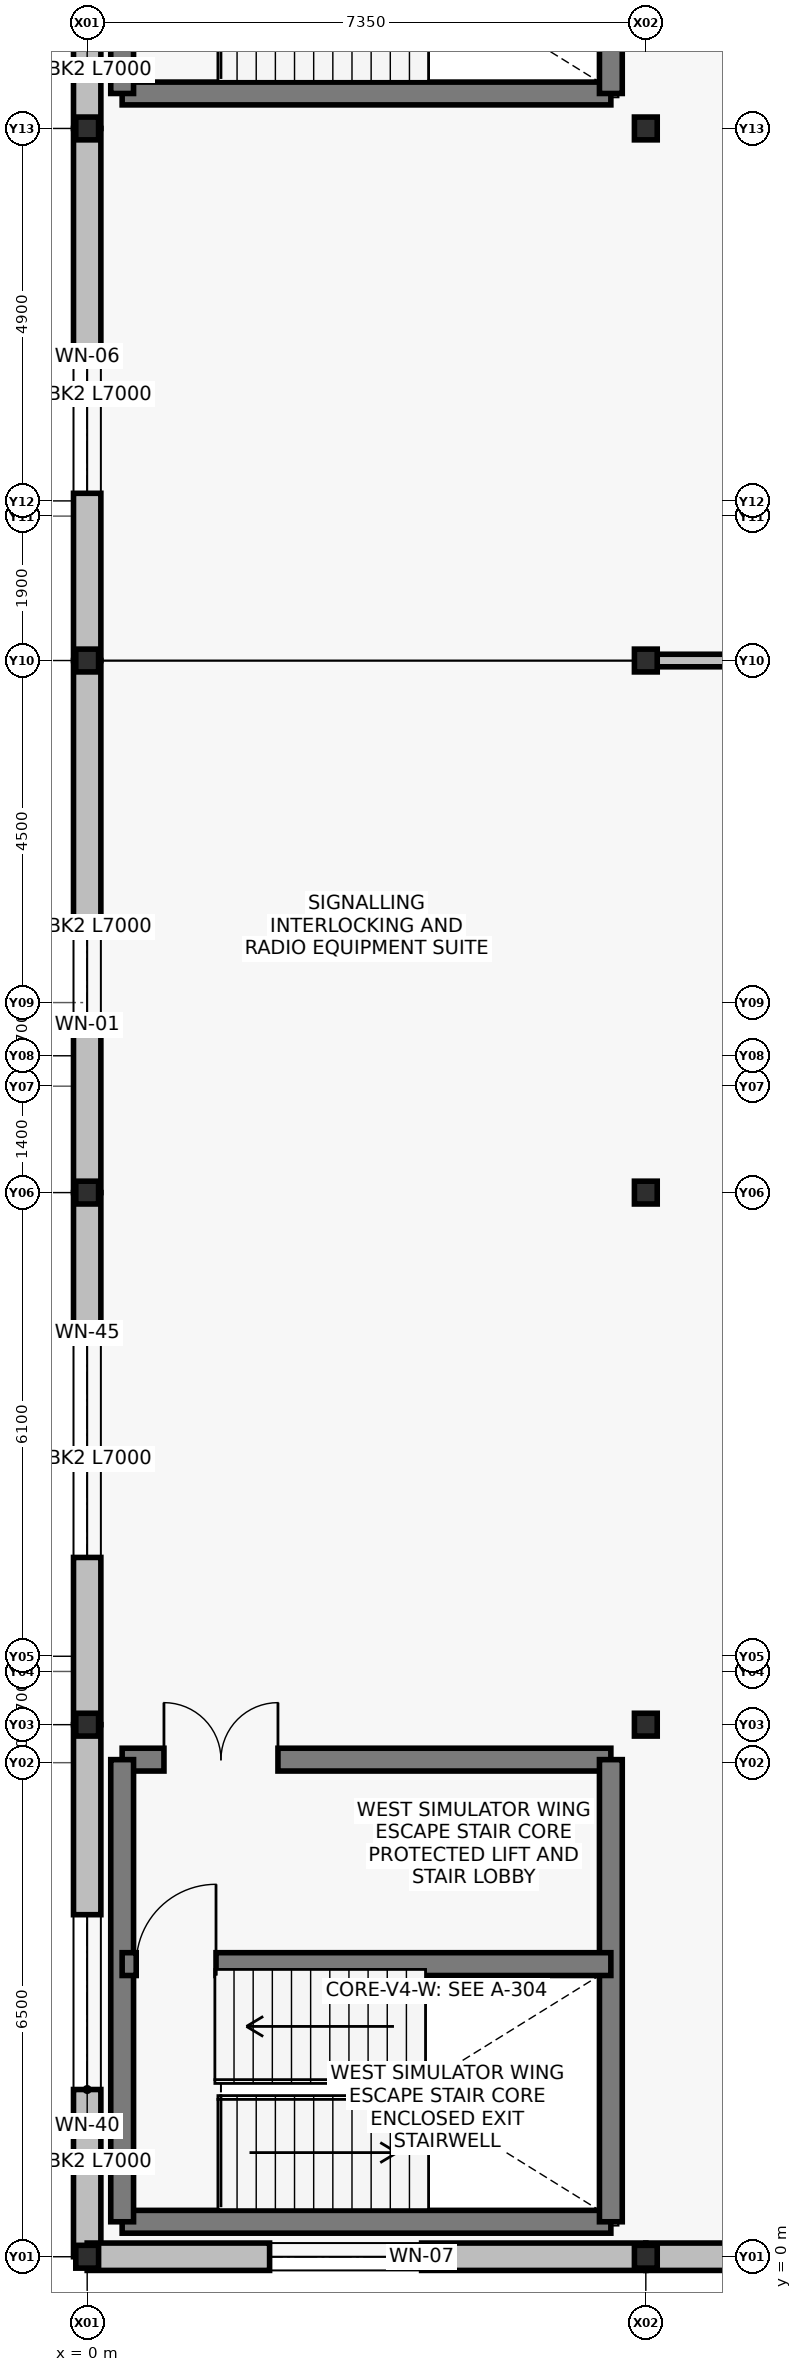
"""IFC4 building model, lengths in metres.
Left out: names, types, materials, properties, quantities, classifications, styles, units other than length and angle.
Written with IfcOpenShell. Run it as: python <this file> out.ifc"""

import sys

from ifc_helpers import new_model, si_unit, direction, frame, frame_2d, origin, origin_with_axes, origin_2d, place, context, subcontext, project, spatial, rectangle, i_section, extrude, element, fill, save


model = new_model("IFC4")
c1 = context("Model", 3, precision=1e-05, world=origin(), true_north=direction((0.0, 1.0)))
c2 = subcontext(c1, "Body", "Model", "MODEL_VIEW")
j1 = project(units=[si_unit("LENGTHUNIT", "METRE"), si_unit("PLANEANGLEUNIT", "RADIAN")], contexts=[c1])
p1 = place(None, origin())
s1 = spatial("IfcSite", under=j1, at=p1, CompositionType="ELEMENT")
p2 = place(p1, origin())
s2 = spatial("IfcBuilding", under=s1, at=p2, CompositionType="ELEMENT")
p3 = place(p2, frame((0.0, 0.0, 11.1)))
s3 = spatial("IfcBuildingStorey", under=s2, at=p3, CompositionType="ELEMENT", Elevation=11.1)
for number, where, z_axis, x_axis in (
    (1, (0.0, 0.0, 0.0), (0.0, 0.0, 1.0), (1.0, 0.0, 0.0)),
    (2, (0.0, 7.0, 0.0), (0.0, 0.0, 1.0), (1.0, 0.0, 0.0)),
    (3, (0.0, 14.0, 0.0), (0.0, 0.0, 1.0), (1.0, 0.0, 0.0)),
    (4, (0.0, 21.0, 0.0), (0.0, 0.0, 1.0), (1.0, 0.0, 0.0)),
    (5, (0.0, 28.0, 0.0), (0.0, 0.0, 1.0), (1.0, 0.0, 0.0)),
    (6, (7.35, 0.0, 0.0), (0.0, 0.0, 1.0), (1.0, 0.0, 0.0)),
    (7, (7.35, 7.0, 0.0), (0.0, 0.0, 1.0), (1.0, 0.0, 0.0)),
    (8, (7.35, 14.0, 0.0), (0.0, 0.0, 1.0), (1.0, 0.0, 0.0)),
    (9, (7.35, 21.0, 0.0), (0.0, 0.0, 1.0), (1.0, 0.0, 0.0)),
    (10, (7.35, 28.0, 0.0), (0.0, 0.0, 1.0), (1.0, 0.0, 0.0)),
):
    element("IfcColumn", number, at=place(p3, frame(where, z_axis=z_axis, x_axis=x_axis)), inside=s3, PredefinedType="COLUMN", context=c2, shape_type="SweptSolid", body=[
        extrude(i_section(OverallWidth=0.3, OverallDepth=0.3, WebThickness=0.01, FlangeThickness=0.015, at=origin_2d()), origin(), (0.0, 0.0, 1.0), 4.2),
    ])
p4 = place(p3, frame((0.0, 0.0, 0.0), z_axis=(0.0, 0.0, 1.0), x_axis=(0.0, 1.0, 0.0)))
e11 = element("IfcWall", 11, at=p4, inside=s3, PredefinedType="SOLIDWALL", context=c2, shape_type="SweptSolid", body=[
    extrude(rectangle(XDim=7.0, YDim=0.36, at=frame_2d((3.5, 0.0))), origin(), (0.0, 0.0, 1.0), 3.35),
])
p5 = place(p4, frame((2.2, 0.0, 0.95)))
e12 = element("IfcOpeningElement", 12, at=p5, cuts=e11, PredefinedType="OPENING", context=c2, shape_type="SweptSolid", body=[
    extrude(rectangle(XDim=2.3, YDim=1.85, at=frame_2d((1.15, 0.925))), frame((0.0, 0.19, 0.0), z_axis=(0.0, -1.0, 0.0), x_axis=(1.0, 0.0, 0.0)), (0.0, 0.0, 1.0), 0.38),
])
p6 = place(p3, frame((0.0, 7.0, 0.0), z_axis=(0.0, 0.0, 1.0), x_axis=(0.0, 1.0, 0.0)))
e13 = element("IfcWall", 13, at=p6, inside=s3, PredefinedType="SOLIDWALL", context=c2, shape_type="SweptSolid", body=[
    extrude(rectangle(XDim=7.0, YDim=0.36, at=frame_2d((3.5, 0.0))), origin(), (0.0, 0.0, 1.0), 3.35),
])
p7 = place(p6, frame((2.2, 0.0, 0.95)))
e14 = element("IfcOpeningElement", 14, at=p7, cuts=e13, PredefinedType="OPENING", context=c2, shape_type="SweptSolid", body=[
    extrude(rectangle(XDim=2.95, YDim=2.15, at=frame_2d((1.475, 1.075))), frame((0.0, 0.19, 0.0), z_axis=(0.0, -1.0, 0.0), x_axis=(1.0, 0.0, 0.0)), (0.0, 0.0, 1.0), 0.38),
])
p8 = place(p3, frame((0.0, 14.0, 0.0), z_axis=(0.0, 0.0, 1.0), x_axis=(0.0, 1.0, 0.0)))
e15 = element("IfcWall", 15, at=p8, inside=s3, PredefinedType="SOLIDWALL", context=c2, shape_type="SweptSolid", body=[
    extrude(rectangle(XDim=7.0, YDim=0.36, at=frame_2d((3.5, 0.0))), origin(), (0.0, 0.0, 1.0), 3.35),
])
p9 = place(p8, frame((2.2, 0.0, 0.95)))
e16 = element("IfcOpeningElement", 16, at=p9, cuts=e15, PredefinedType="OPENING", context=c2, shape_type="SweptSolid", body=[
    extrude(rectangle(XDim=1.2, YDim=1.5, at=frame_2d((0.6, 0.75))), frame((0.0, 0.19, 0.0), z_axis=(0.0, -1.0, 0.0), x_axis=(1.0, 0.0, 0.0)), (0.0, 0.0, 1.0), 0.38),
])
p10 = place(p3, frame((0.0, 21.0, 0.0), z_axis=(0.0, 0.0, 1.0), x_axis=(0.0, 1.0, 0.0)))
e17 = element("IfcWall", 17, at=p10, inside=s3, PredefinedType="SOLIDWALL", context=c2, shape_type="SweptSolid", body=[
    extrude(rectangle(XDim=7.0, YDim=0.36, at=frame_2d((3.5, 0.0))), origin(), (0.0, 0.0, 1.0), 3.35),
])
p11 = place(p10, frame((2.2, 0.0, 0.95)))
e18 = element("IfcOpeningElement", 18, at=p11, cuts=e17, PredefinedType="OPENING", context=c2, shape_type="SweptSolid", body=[
    extrude(rectangle(XDim=1.8, YDim=2.1, at=frame_2d((0.9, 1.05))), frame((0.0, 0.19, 0.0), z_axis=(0.0, -1.0, 0.0), x_axis=(1.0, 0.0, 0.0)), (0.0, 0.0, 1.0), 0.38),
])
p12 = place(p3, frame((0.0, 28.0, 0.0), z_axis=(0.0, 0.0, 1.0), x_axis=(0.0, 1.0, 0.0)))
e19 = element("IfcWall", 19, at=p12, inside=s3, PredefinedType="SOLIDWALL", context=c2, shape_type="SweptSolid", body=[
    extrude(rectangle(XDim=7.0, YDim=0.36, at=frame_2d((3.5, 0.0))), origin(), (0.0, 0.0, 1.0), 3.35),
])
p13 = place(p12, frame((2.2, 0.0, 0.95)))
e20 = element("IfcOpeningElement", 20, at=p13, cuts=e19, PredefinedType="OPENING", context=c2, shape_type="SweptSolid", body=[
    extrude(rectangle(XDim=2.6, YDim=2.0, at=frame_2d((1.3, 1.0))), frame((0.0, 0.19, 0.0), z_axis=(0.0, -1.0, 0.0), x_axis=(1.0, 0.0, 0.0)), (0.0, 0.0, 1.0), 0.38),
])
p14 = place(p3, origin_with_axes())
e21 = element("IfcWall", 21, at=p14, inside=s3, PredefinedType="SOLIDWALL", context=c2, shape_type="SweptSolid", body=[
    extrude(rectangle(XDim=7.35, YDim=0.36, at=frame_2d((3.675, 0.0))), origin(), (0.0, 0.0, 1.0), 3.35),
])
p15 = place(p14, frame((2.4, 0.0, 0.9)))
e22 = element("IfcOpeningElement", 22, at=p15, cuts=e21, PredefinedType="OPENING", context=c2, shape_type="SweptSolid", body=[
    extrude(rectangle(XDim=2.0, YDim=1.8, at=frame_2d((1.0, 0.9))), frame((0.0, 0.19, 0.0), z_axis=(0.0, -1.0, 0.0), x_axis=(1.0, 0.0, 0.0)), (0.0, 0.0, 1.0), 0.38),
])
p16 = place(p3, frame((7.35, 0.0, 0.0), z_axis=(0.0, 0.0, 1.0), x_axis=(1.0, 0.0, 0.0)))
e23 = element("IfcWall", 23, at=p16, inside=s3, PredefinedType="SOLIDWALL", context=c2, shape_type="SweptSolid", body=[
    extrude(rectangle(XDim=7.35, YDim=0.36, at=frame_2d((3.675, 0.0))), origin(), (0.0, 0.0, 1.0), 3.35),
])
p17 = place(p16, frame((2.4, 0.0, 0.9)))
e24 = element("IfcOpeningElement", 24, at=p17, cuts=e23, PredefinedType="OPENING", context=c2, shape_type="SweptSolid", body=[
    extrude(rectangle(XDim=2.1, YDim=2.1, at=frame_2d((1.05, 1.05))), frame((0.0, 0.19, 0.0), z_axis=(0.0, -1.0, 0.0), x_axis=(1.0, 0.0, 0.0)), (0.0, 0.0, 1.0), 0.38),
])
p18 = place(p3, frame((0.46, 28.46, 0.0), z_axis=(0.0, 0.0, 1.0), x_axis=(1.0, 0.0, 0.0)))
e25 = element("IfcWall", 25, at=p18, inside=s3, PredefinedType="SHEAR", context=c2, shape_type="SweptSolid", body=[
    extrude(rectangle(XDim=6.43, YDim=0.3, at=frame_2d((3.215, 0.0))), origin(), (0.0, 0.0, 1.0), 3.92),
])
for number, where, z_axis, x_axis in (
    (26, (0.46, 28.46, 0.0), (0.0, 0.0, 1.0), (0.0, 1.0, 0.0)),
    (27, (6.89, 28.46, 0.0), (0.0, 0.0, 1.0), (0.0, 1.0, 0.0)),
):
    element("IfcWall", number, at=place(p3, frame(where, z_axis=z_axis, x_axis=x_axis)), inside=s3, PredefinedType="SHEAR", context=c2, shape_type="SweptSolid", body=[
        extrude(rectangle(XDim=6.08, YDim=0.3, at=frame_2d((3.04, 0.0))), origin(), (0.0, 0.0, 1.0), 3.92),
    ])
p19 = place(p3, frame((0.46, 0.46, 0.0), z_axis=(0.0, 0.0, 1.0), x_axis=(1.0, 0.0, 0.0)))
e28 = element("IfcWall", 28, at=p19, inside=s3, PredefinedType="SHEAR", context=c2, shape_type="SweptSolid", body=[
    extrude(rectangle(XDim=6.43, YDim=0.3, at=frame_2d((3.215, 0.0))), origin(), (0.0, 0.0, 1.0), 3.92),
])
p20 = place(p3, frame((0.46, 6.54, 0.0), z_axis=(0.0, 0.0, 1.0), x_axis=(1.0, 0.0, 0.0)))
e29 = element("IfcWall", 29, at=p20, inside=s3, PredefinedType="SHEAR", context=c2, shape_type="SweptSolid", body=[
    extrude(rectangle(XDim=6.43, YDim=0.3, at=frame_2d((3.215, 0.0))), origin(), (0.0, 0.0, 1.0), 3.92),
])
p21 = place(p20, frame((0.55, 0.0, 0.0)))
e30 = element("IfcOpeningElement", 30, at=p21, cuts=e29, PredefinedType="OPENING", context=c2, shape_type="SweptSolid", body=[
    extrude(rectangle(XDim=1.5, YDim=2.2, at=frame_2d((0.75, 1.1))), frame((0.0, 0.16, 0.0), z_axis=(0.0, -1.0, 0.0), x_axis=(1.0, 0.0, 0.0)), (0.0, 0.0, 1.0), 0.32),
])
for number, where, z_axis, x_axis in (
    (31, (0.46, 0.46, 0.0), (0.0, 0.0, 1.0), (0.0, 1.0, 0.0)),
    (32, (6.89, 0.46, 0.0), (0.0, 0.0, 1.0), (0.0, 1.0, 0.0)),
):
    element("IfcWall", number, at=place(p3, frame(where, z_axis=z_axis, x_axis=x_axis)), inside=s3, PredefinedType="SHEAR", context=c2, shape_type="SweptSolid", body=[
        extrude(rectangle(XDim=6.08, YDim=0.3, at=frame_2d((3.04, 0.0))), origin(), (0.0, 0.0, 1.0), 3.92),
    ])
p22 = place(p3, frame((0.46, 3.85, 0.0), z_axis=(0.0, 0.0, 1.0), x_axis=(1.0, 0.0, 0.0)))
e33 = element("IfcWall", 33, at=p22, inside=s3, PredefinedType="SHEAR", context=c2, shape_type="SweptSolid", body=[
    extrude(rectangle(XDim=6.43, YDim=0.3, at=frame_2d((3.215, 0.0))), origin(), (0.0, 0.0, 1.0), 3.92),
])
p23 = place(p22, frame((0.185, 0.0, 0.0)))
e34 = element("IfcOpeningElement", 34, at=p23, cuts=e33, PredefinedType="OPENING", context=c2, shape_type="SweptSolid", body=[
    extrude(rectangle(XDim=1.05, YDim=2.15, at=frame_2d((0.525, 1.075))), frame((0.0, 0.16, 0.0), z_axis=(0.0, -1.0, 0.0), x_axis=(1.0, 0.0, 0.0)), (0.0, 0.0, 1.0), 0.32),
])
p24 = place(p3, frame((7.35, 21.0, 0.0), z_axis=(0.0, 0.0, 1.0), x_axis=(1.0, 0.0, 0.0)))
e35 = element("IfcWall", 35, at=p24, inside=s3, PredefinedType="PARTITIONING", context=c2, shape_type="SweptSolid", body=[
    extrude(rectangle(XDim=29.4, YDim=0.165, at=frame_2d((14.7, 0.0))), origin(), (0.0, 0.0, 1.0), 3.15),
])
p25 = place(p24, frame((4.0, 0.0, 0.0)))
e36 = element("IfcOpeningElement", 36, at=p25, cuts=e35, PredefinedType="OPENING", context=c2, shape_type="SweptSolid", body=[
    extrude(rectangle(XDim=1.35, YDim=2.2, at=frame_2d((0.675, 1.1))), frame((0.0, 0.092, 0.0), z_axis=(0.0, -1.0, 0.0), x_axis=(1.0, 0.0, 0.0)), (0.0, 0.0, 1.0), 0.185),
])
p26 = place(p24, frame((18.5, 0.0, 0.0)))
e37 = element("IfcOpeningElement", 37, at=p26, cuts=e35, PredefinedType="OPENING", context=c2, shape_type="SweptSolid", body=[
    extrude(rectangle(XDim=1.4, YDim=2.2, at=frame_2d((0.7, 1.1))), frame((0.0, 0.092, 0.0), z_axis=(0.0, -1.0, 0.0), x_axis=(1.0, 0.0, 0.0)), (0.0, 0.0, 1.0), 0.185),
])
p27 = place(p5, origin())
e38 = element("IfcWindow", 38, at=p27, inside=s3, PartitioningType="SINGLE_PANEL", PredefinedType="WINDOW", context=c2, shape_type="SweptSolid", body=[
    extrude(rectangle(XDim=2.3, YDim=1.85, at=frame_2d((1.15, 0.925))), frame((0.0, 0.03, 0.0), z_axis=(0.0, -1.0, 0.0), x_axis=(1.0, 0.0, 0.0)), (0.0, 0.0, 1.0), 0.06),
])
fill(e12, e38)
p28 = place(p7, origin())
e39 = element("IfcWindow", 39, at=p28, inside=s3, PartitioningType="SINGLE_PANEL", PredefinedType="WINDOW", context=c2, shape_type="SweptSolid", body=[
    extrude(rectangle(XDim=2.95, YDim=2.15, at=frame_2d((1.475, 1.075))), frame((0.0, 0.03, 0.0), z_axis=(0.0, -1.0, 0.0), x_axis=(1.0, 0.0, 0.0)), (0.0, 0.0, 1.0), 0.06),
])
fill(e14, e39)
p29 = place(p9, origin())
e40 = element("IfcWindow", 40, at=p29, inside=s3, PartitioningType="SINGLE_PANEL", PredefinedType="WINDOW", context=c2, shape_type="SweptSolid", body=[
    extrude(rectangle(XDim=1.2, YDim=1.5, at=frame_2d((0.6, 0.75))), frame((0.0, 0.03, 0.0), z_axis=(0.0, -1.0, 0.0), x_axis=(1.0, 0.0, 0.0)), (0.0, 0.0, 1.0), 0.06),
])
fill(e16, e40)
p30 = place(p11, origin())
e41 = element("IfcWindow", 41, at=p30, inside=s3, PartitioningType="SINGLE_PANEL", PredefinedType="WINDOW", context=c2, shape_type="SweptSolid", body=[
    extrude(rectangle(XDim=1.8, YDim=2.1, at=frame_2d((0.9, 1.05))), frame((0.0, 0.03, 0.0), z_axis=(0.0, -1.0, 0.0), x_axis=(1.0, 0.0, 0.0)), (0.0, 0.0, 1.0), 0.06),
])
fill(e18, e41)
p31 = place(p15, origin())
e42 = element("IfcWindow", 42, at=p31, inside=s3, PartitioningType="SINGLE_PANEL", PredefinedType="WINDOW", context=c2, shape_type="SweptSolid", body=[
    extrude(rectangle(XDim=2.0, YDim=1.8, at=frame_2d((1.0, 0.9))), frame((0.0, 0.03, 0.0), z_axis=(0.0, -1.0, 0.0), x_axis=(1.0, 0.0, 0.0)), (0.0, 0.0, 1.0), 0.06),
])
fill(e22, e42)
p32 = place(p23, origin())
e43 = element("IfcDoor", 43, at=p32, inside=s3, OperationType="SINGLE_SWING_RIGHT", PredefinedType="DOOR", context=c2, shape_type="SweptSolid", body=[
    extrude(rectangle(XDim=1.05, YDim=2.15, at=frame_2d((0.525, 1.075))), frame((0.0, 0.025, 0.0), z_axis=(0.0, -1.0, 0.0), x_axis=(1.0, 0.0, 0.0)), (0.0, 0.0, 1.0), 0.05),
])
fill(e34, e43)
p33 = place(p21, origin())
e44 = element("IfcDoor", 44, at=p33, inside=s3, OperationType="DOUBLE_DOOR_SINGLE_SWING", PredefinedType="DOOR", context=c2, shape_type="SweptSolid", body=[
    extrude(rectangle(XDim=1.5, YDim=2.2, at=frame_2d((0.75, 1.1))), frame((0.0, 0.025, 0.0), z_axis=(0.0, -1.0, 0.0), x_axis=(1.0, 0.0, 0.0)), (0.0, 0.0, 1.0), 0.05),
])
fill(e30, e44)
save(model, sys.argv[1])
